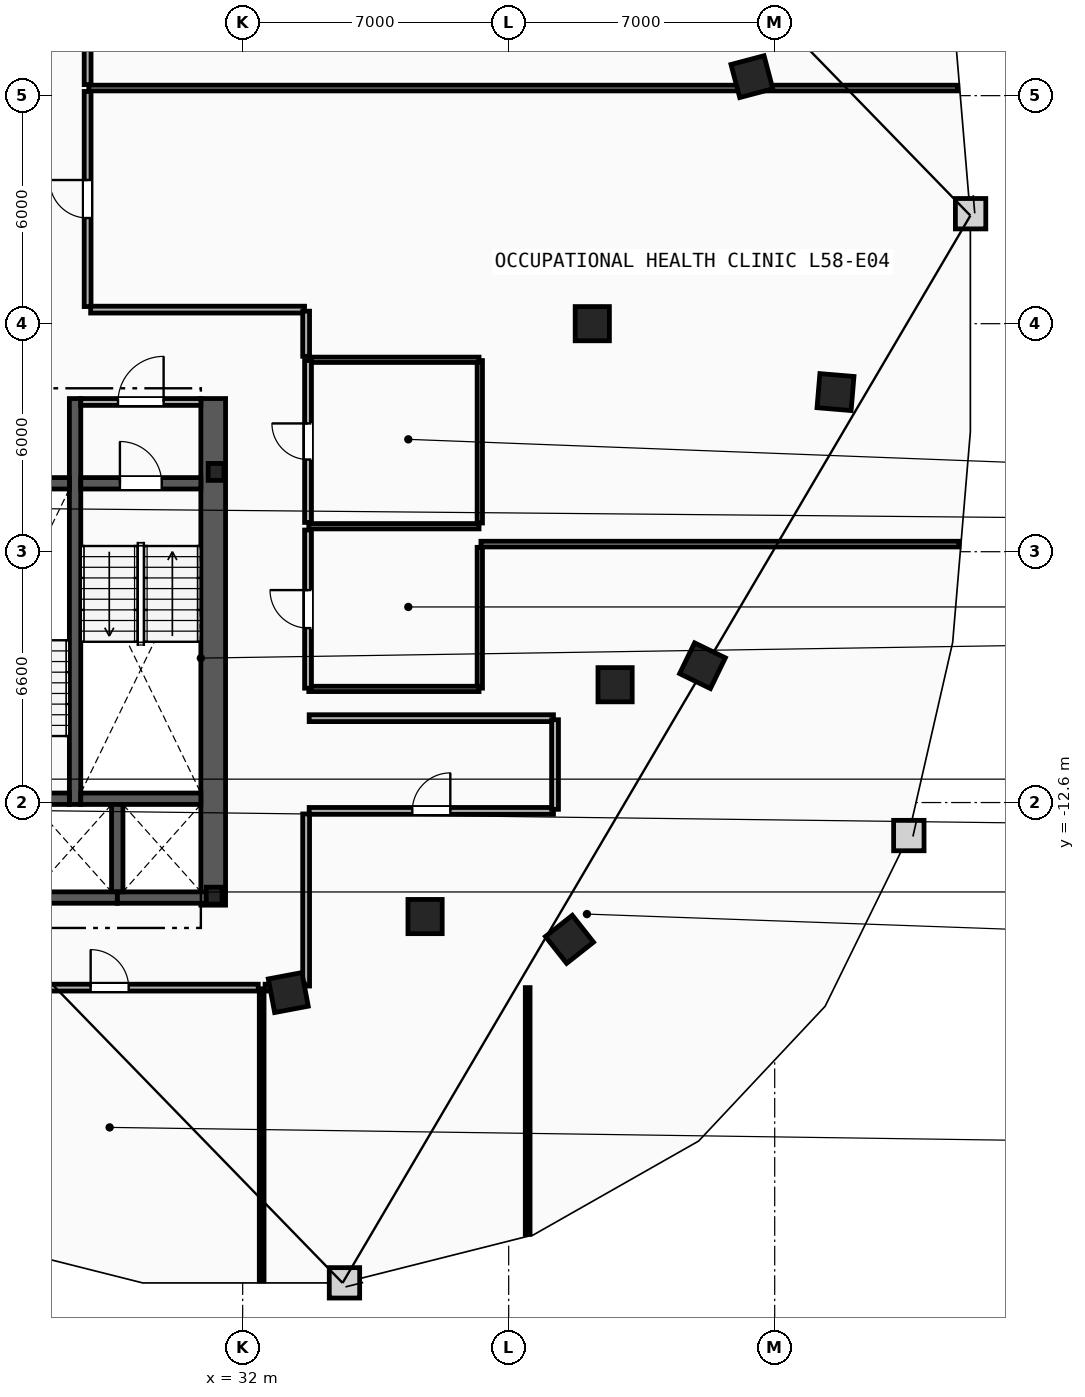
"""IFC4 building model, lengths in metres.
Left out: names, types, materials, properties, quantities, classifications, styles, units other than length and angle.
Written with IfcOpenShell. Run it as: python <this file> out.ifc"""

import sys

from ifc_helpers import new_model, si_unit, direction, frame, frame_2d, origin, origin_2d, place, context, subcontext, project, spatial, rectangle, i_section, extrude, element, fill, save


model = new_model("IFC4")
c1 = context("Model", 3, precision=1e-05, world=origin(), true_north=direction((0.0, 1.0)))
c2 = subcontext(c1, "Body", "Model", "MODEL_VIEW")
j1 = project(units=[si_unit("LENGTHUNIT", "METRE"), si_unit("PLANEANGLEUNIT", "RADIAN")], contexts=[c1])
p1 = place(None, origin())
s1 = spatial("IfcSite", under=j1, at=p1, CompositionType="ELEMENT")
p2 = place(p1, origin())
s2 = spatial("IfcBuilding", under=s1, at=p2, CompositionType="ELEMENT")
p3 = place(p2, frame((0.0, 0.0, 220.6)))
s3 = spatial("IfcBuildingStorey", under=s2, at=p3, CompositionType="ELEMENT", Elevation=220.6)
for number, where, z_axis, x_axis in (
    (1, (31.3, -3.9, 0.0), (0.0, 0.0, 1.0), (1.0, 0.0, 0.0)),
    (2, (31.25, -15.05, 0.0), (0.0, 0.0, 1.0), (1.0, 0.0, 0.0)),
):
    element("IfcColumn", number, at=place(p3, frame(where, z_axis=z_axis, x_axis=x_axis)), inside=s3, PredefinedType="COLUMN", context=c2, shape_type="SweptSolid", body=[
        extrude(i_section(OverallWidth=0.416, OverallDepth=0.446, WebThickness=0.039, FlangeThickness=0.063, FilletRadius=0.018, at=origin_2d()), origin(), (0.0, 0.0, 1.0), 3.6),
    ])
for number, where, z_axis, x_axis in (
    (3, (41.2, 0.0, 0.0), (0.0, 0.0, 1.0), (1.0, 0.0, 0.0)),
    (4, (41.8, -9.5, 0.0), (0.0, 0.0, 1.0), (1.0, 0.0, 0.0)),
    (5, (36.8, -15.6, 0.0), (0.0, 0.0, 1.0), (1.0, 0.0, 0.0)),
    (6, (33.2, -17.6, 0.0), (0.0, 0.0, 1.0), (0.983, 0.186, 0.0)),
    (7, (40.6, -16.2, 0.0), (0.0, 0.0, 1.0), (0.785, 0.619, 0.0)),
    (8, (44.1, -9.0, 0.0), (0.0, 0.0, 1.0), (0.437, 0.899, 0.0)),
    (9, (47.6, -1.8, 0.0), (0.0, 0.0, 1.0), (0.084, 0.997, 0.0)),
    (10, (45.4, 6.5, 0.0), (0.0, 0.0, 1.0), (-0.256, 0.967, 0.0)),
):
    element("IfcColumn", number, at=place(p3, frame(where, z_axis=z_axis, x_axis=x_axis)), inside=s3, PredefinedType="COLUMN", context=c2, shape_type="SweptSolid", body=[
        extrude(rectangle(XDim=0.9, YDim=0.9, at=origin_2d()), origin(), (0.0, 0.0, 1.0), 3.6),
    ])
p4 = place(p3, frame((31.225, -15.3, 0.0), z_axis=(0.0, 0.0, 1.0), x_axis=(0.0, 1.0, 0.0)))
e11 = element("IfcWall", 11, at=p4, inside=s3, PredefinedType="SHEAR", context=c2, shape_type="SweptSolid", body=[
    extrude(rectangle(XDim=13.33, YDim=0.65, at=frame_2d((6.665, 0.0))), origin(), (0.0, 0.0, 1.0), 3.34),
])
p5 = place(p3, frame((27.59, -12.65, 0.0), z_axis=(0.0, 0.0, 1.0), x_axis=(0.0, 1.0, 0.0)))
e12 = element("IfcWall", 12, at=p5, inside=s3, PredefinedType="SHEAR", context=c2, shape_type="SweptSolid", body=[
    extrude(rectangle(XDim=10.68, YDim=0.3, at=frame_2d((5.34, 0.0))), origin(), (0.0, 0.0, 1.0), 3.34),
])
p6 = place(p3, frame((27.74, -4.2, 0.0), z_axis=(0.0, 0.0, 1.0), x_axis=(1.0, 0.0, 0.0)))
e13 = element("IfcWall", 13, at=p6, inside=s3, PredefinedType="SHEAR", context=c2, shape_type="SweptSolid", body=[
    extrude(rectangle(XDim=3.16, YDim=0.3, at=frame_2d((1.58, 0.0))), origin(), (0.0, 0.0, 1.0), 3.34),
])
p7 = place(p6, frame((1.03, 0.0, 0.0)))
e14 = element("IfcOpeningElement", 14, at=p7, cuts=e13, PredefinedType="OPENING", context=c2, shape_type="SweptSolid", body=[
    extrude(rectangle(XDim=1.1, YDim=2.15, at=frame_2d((0.55, 1.075))), frame((0.0, 0.16, 0.0), z_axis=(0.0, -1.0, 0.0), x_axis=(1.0, 0.0, 0.0)), (0.0, 0.0, 1.0), 0.32),
])
p8 = place(p3, frame((27.74, -12.5, 0.0), z_axis=(0.0, 0.0, 1.0), x_axis=(1.0, 0.0, 0.0)))
e15 = element("IfcWall", 15, at=p8, inside=s3, PredefinedType="SHEAR", context=c2, shape_type="SweptSolid", body=[
    extrude(rectangle(XDim=3.16, YDim=0.3, at=frame_2d((1.58, 0.0))), origin(), (0.0, 0.0, 1.0), 3.34),
])
p9 = place(p3, frame((24.28, -12.5, 0.0), z_axis=(0.0, 0.0, 1.0), x_axis=(1.0, 0.0, 0.0)))
e16 = element("IfcWall", 16, at=p9, inside=s3, PredefinedType="SHEAR", context=c2, shape_type="SweptSolid", body=[
    extrude(rectangle(XDim=3.16, YDim=0.3, at=frame_2d((1.58, 0.0))), origin(), (0.0, 0.0, 1.0), 3.34),
])
p10 = place(p9, frame((1.03, 0.0, 0.0)))
e17 = element("IfcOpeningElement", 17, at=p10, cuts=e16, PredefinedType="OPENING", context=c2, shape_type="SweptSolid", body=[
    extrude(rectangle(XDim=1.1, YDim=2.15, at=frame_2d((0.55, 1.075))), frame((0.0, 0.16, 0.0), z_axis=(0.0, -1.0, 0.0), x_axis=(1.0, 0.0, 0.0)), (0.0, 0.0, 1.0), 0.32),
])
p11 = place(p3, frame((24.28, -4.2, 0.0), z_axis=(0.0, 0.0, 1.0), x_axis=(1.0, 0.0, 0.0)))
e18 = element("IfcWall", 18, at=p11, inside=s3, PredefinedType="SHEAR", context=c2, shape_type="SweptSolid", body=[
    extrude(rectangle(XDim=3.16, YDim=0.3, at=frame_2d((1.58, 0.0))), origin(), (0.0, 0.0, 1.0), 3.34),
])
p12 = place(p3, frame((27.74, -2.06, 0.0), z_axis=(0.0, 0.0, 1.0), x_axis=(1.0, 0.0, 0.0)))
e19 = element("IfcWall", 19, at=p12, inside=s3, PredefinedType="PARTITIONING", context=c2, shape_type="SweptSolid", body=[
    extrude(rectangle(XDim=3.16, YDim=0.18, at=frame_2d((1.58, 0.0))), origin(), (0.0, 0.0, 1.0), 3.34),
])
p13 = place(p12, frame((0.98, 0.0, 0.0)))
e20 = element("IfcOpeningElement", 20, at=p13, cuts=e19, PredefinedType="OPENING", context=c2, shape_type="SweptSolid", body=[
    extrude(rectangle(XDim=1.2, YDim=2.15, at=frame_2d((0.6, 1.075))), frame((0.0, 0.1, 0.0), z_axis=(0.0, -1.0, 0.0), x_axis=(1.0, 0.0, 0.0)), (0.0, 0.0, 1.0), 0.2),
])
p14 = place(p3, frame((28.7, -15.1, 0.0), z_axis=(0.0, 0.0, 1.0), x_axis=(1.0, 0.0, 0.0)))
e21 = element("IfcWall", 21, at=p14, inside=s3, PredefinedType="SHEAR", context=c2, shape_type="SweptSolid", body=[
    extrude(rectangle(XDim=2.5, YDim=0.3, at=frame_2d((1.25, 0.0))), origin(), (0.0, 0.0, 1.0), 3.34),
])
p15 = place(p3, frame((28.7, -14.95, 0.0), z_axis=(0.0, 0.0, 1.0), x_axis=(0.0, 1.0, 0.0)))
e22 = element("IfcWall", 22, at=p15, inside=s3, PredefinedType="SHEAR", context=c2, shape_type="SweptSolid", body=[
    extrude(rectangle(XDim=2.3, YDim=0.3, at=frame_2d((1.15, 0.0))), origin(), (0.0, 0.0, 1.0), 3.34),
])
p16 = place(p3, frame((26.2, -15.1, 0.0), z_axis=(0.0, 0.0, 1.0), x_axis=(1.0, 0.0, 0.0)))
e23 = element("IfcWall", 23, at=p16, inside=s3, PredefinedType="SHEAR", context=c2, shape_type="SweptSolid", body=[
    extrude(rectangle(XDim=2.5, YDim=0.3, at=frame_2d((1.25, 0.0))), origin(), (0.0, 0.0, 1.0), 3.34),
])
p17 = place(p3, frame((38.24, -9.59, 0.0), z_axis=(0.0, 0.0, 1.0), x_axis=(0.0, 1.0, 0.0)))
e24 = element("IfcWall", 24, at=p17, inside=s3, PredefinedType="PARTITIONING", context=c2, shape_type="SweptSolid", body=[
    extrude(rectangle(XDim=3.705, YDim=0.14, at=frame_2d((1.853, 0.0))), origin(), (0.0, 0.0, 1.0), 3.34),
])
p18 = place(p3, frame((38.24, -5.245, 0.0), z_axis=(0.0, 0.0, 1.0), x_axis=(0.0, 1.0, 0.0)))
e25 = element("IfcWall", 25, at=p18, inside=s3, PredefinedType="PARTITIONING", context=c2, shape_type="SweptSolid", body=[
    extrude(rectangle(XDim=4.275, YDim=0.14, at=frame_2d((2.138, 0.0))), origin(), (0.0, 0.0, 1.0), 3.34),
])
for number, where, z_axis, x_axis in (
    (26, (33.74, -0.95, 0.0), (0.0, 0.0, 1.0), (1.0, 0.0, 0.0)),
    (27, (33.74, -5.33, 0.0), (0.0, 0.0, 1.0), (1.0, 0.0, 0.0)),
    (28, (33.74, -9.61, 0.0), (0.0, 0.0, 1.0), (1.0, 0.0, 0.0)),
):
    element("IfcWall", number, at=place(p3, frame(where, z_axis=z_axis, x_axis=x_axis)), inside=s3, PredefinedType="PARTITIONING", context=c2, shape_type="SweptSolid", body=[
        extrude(rectangle(XDim=4.48, YDim=0.14, at=frame_2d((2.24, 0.0))), origin(), (0.0, 0.0, 1.0), 3.34),
    ])
p19 = place(p3, frame((33.72, -5.23, 0.0), z_axis=(0.0, 0.0, 1.0), x_axis=(0.0, 1.0, 0.0)))
e29 = element("IfcWall", 29, at=p19, inside=s3, PredefinedType="PARTITIONING", context=c2, shape_type="SweptSolid", body=[
    extrude(rectangle(XDim=4.26, YDim=0.18, at=frame_2d((2.13, 0.0))), origin(), (0.0, 0.0, 1.0), 3.34),
])
p20 = place(p19, frame((1.655, 0.0, 0.0)))
e30 = element("IfcOpeningElement", 30, at=p20, cuts=e29, PredefinedType="OPENING", context=c2, shape_type="SweptSolid", body=[
    extrude(rectangle(XDim=0.95, YDim=2.1, at=frame_2d((0.475, 1.05))), frame((0.0, 0.1, 0.0), z_axis=(0.0, -1.0, 0.0), x_axis=(1.0, 0.0, 0.0)), (0.0, 0.0, 1.0), 0.2),
])
p21 = place(p3, frame((33.72, -9.59, 0.0), z_axis=(0.0, 0.0, 1.0), x_axis=(0.0, 1.0, 0.0)))
e31 = element("IfcWall", 31, at=p21, inside=s3, PredefinedType="PARTITIONING", context=c2, shape_type="SweptSolid", body=[
    extrude(rectangle(XDim=4.16, YDim=0.18, at=frame_2d((2.08, 0.0))), origin(), (0.0, 0.0, 1.0), 3.34),
])
p22 = place(p21, frame((1.58, 0.0, 0.0)))
e32 = element("IfcOpeningElement", 32, at=p22, cuts=e31, PredefinedType="OPENING", context=c2, shape_type="SweptSolid", body=[
    extrude(rectangle(XDim=1.0, YDim=2.15, at=frame_2d((0.5, 1.075))), frame((0.0, 0.1, 0.0), z_axis=(0.0, -1.0, 0.0), x_axis=(1.0, 0.0, 0.0)), (0.0, 0.0, 1.0), 0.2),
])
p23 = place(p3, frame((27.95, 6.2, 0.0), z_axis=(0.0, 0.0, 1.0), x_axis=(1.0, 0.0, 0.0)))
e33 = element("IfcWall", 33, at=p23, inside=s3, PredefinedType="PARTITIONING", context=c2, shape_type="SweptSolid", body=[
    extrude(rectangle(XDim=22.867, YDim=0.15, at=frame_2d((11.434, 0.0))), origin(), (0.0, 0.0, 1.0), 3.34),
])
p24 = place(p3, frame((38.27, -5.8, 0.0), z_axis=(0.0, 0.0, 1.0), x_axis=(1.0, 0.0, 0.0)))
e34 = element("IfcWall", 34, at=p24, inside=s3, PredefinedType="PARTITIONING", context=c2, shape_type="SweptSolid", body=[
    extrude(rectangle(XDim=12.581, YDim=0.15, at=frame_2d((6.29, 0.0))), origin(), (0.0, 0.0, 1.0), 3.34),
])
p25 = place(p3, frame((32.5, -25.19, 0.0), z_axis=(0.0, 0.0, 1.0), x_axis=(0.0, 1.0, 0.0)))
e35 = element("IfcWall", 35, at=p25, inside=s3, PredefinedType="PARTITIONING", context=c2, shape_type="SweptSolid", body=[
    extrude(rectangle(XDim=7.69, YDim=0.125, at=frame_2d((3.845, 0.0))), origin(), (0.0, 0.0, 1.0), 3.34),
])
p26 = place(p3, frame((39.5, -23.963, 0.0), z_axis=(0.0, 0.0, 1.0), x_axis=(0.0, 1.0, 0.0)))
e36 = element("IfcWall", 36, at=p26, inside=s3, PredefinedType="PARTITIONING", context=c2, shape_type="SweptSolid", body=[
    extrude(rectangle(XDim=6.493, YDim=0.125, at=frame_2d((3.246, 0.0))), origin(), (0.0, 0.0, 1.0), 3.34),
])
p27 = place(p3, frame((24.59, -17.47, 0.0), z_axis=(0.0, 0.0, 1.0), x_axis=(1.0, 0.0, 0.0)))
e37 = element("IfcWall", 37, at=p27, inside=s3, PredefinedType="PARTITIONING", context=c2, shape_type="SweptSolid", body=[
    extrude(rectangle(XDim=7.82, YDim=0.18, at=frame_2d((3.91, 0.0))), origin(), (0.0, 0.0, 1.0), 3.34),
])
p28 = place(p27, frame((3.41, 0.0, 0.0)))
e38 = element("IfcOpeningElement", 38, at=p28, cuts=e37, PredefinedType="OPENING", context=c2, shape_type="SweptSolid", body=[
    extrude(rectangle(XDim=1.0, YDim=2.15, at=frame_2d((0.5, 1.075))), frame((0.0, 0.1, 0.0), z_axis=(0.0, -1.0, 0.0), x_axis=(1.0, 0.0, 0.0)), (0.0, 0.0, 1.0), 0.2),
])
p29 = place(p3, frame((33.75, -12.82, 0.0), z_axis=(0.0, 0.0, 1.0), x_axis=(1.0, 0.0, 0.0)))
e39 = element("IfcWall", 39, at=p29, inside=s3, PredefinedType="PARTITIONING", context=c2, shape_type="SweptSolid", body=[
    extrude(rectangle(XDim=6.428, YDim=0.18, at=frame_2d((3.214, 0.0))), origin(), (0.0, 0.0, 1.0), 3.34),
])
p30 = place(p29, frame((2.714, 0.0, 0.0)))
e40 = element("IfcOpeningElement", 40, at=p30, cuts=e39, PredefinedType="OPENING", context=c2, shape_type="SweptSolid", body=[
    extrude(rectangle(XDim=1.0, YDim=2.15, at=frame_2d((0.5, 1.075))), frame((0.0, 0.1, 0.0), z_axis=(0.0, -1.0, 0.0), x_axis=(1.0, 0.0, 0.0)), (0.0, 0.0, 1.0), 0.2),
])
p31 = place(p3, frame((40.178, -10.38, 0.0), z_axis=(0.0, 0.0, 1.0), x_axis=(-1.0, 0.0, 0.0)))
e41 = element("IfcWall", 41, at=p31, inside=s3, PredefinedType="PARTITIONING", context=c2, shape_type="SweptSolid", body=[
    extrude(rectangle(XDim=6.428, YDim=0.18, at=frame_2d((3.214, 0.0))), origin(), (0.0, 0.0, 1.0), 3.34),
])
p32 = place(p3, frame((33.67, -17.428, 0.0), z_axis=(0.0, 0.0, 1.0), x_axis=(0.0, 1.0, 0.0)))
e42 = element("IfcWall", 42, at=p32, inside=s3, PredefinedType="PARTITIONING", context=c2, shape_type="SweptSolid", body=[
    extrude(rectangle(XDim=4.529, YDim=0.18, at=frame_2d((2.264, 0.0))), origin(), (0.0, 0.0, 1.0), 3.34),
])
p33 = place(p3, frame((40.22, -12.779, 0.0), z_axis=(0.0, 0.0, 1.0), x_axis=(0.0, 1.0, 0.0)))
e43 = element("IfcWall", 43, at=p33, inside=s3, PredefinedType="PARTITIONING", context=c2, shape_type="SweptSolid", body=[
    extrude(rectangle(XDim=2.357, YDim=0.18, at=frame_2d((1.179, 0.0))), origin(), (0.0, 0.0, 1.0), 3.34),
])
p34 = place(p3, frame((32.59, -17.47, 0.0), z_axis=(0.0, 0.0, 1.0), x_axis=(1.0, 0.0, 0.0)))
e44 = element("IfcWall", 44, at=p34, inside=s3, PredefinedType="PARTITIONING", context=c2, shape_type="SweptSolid", body=[
    extrude(rectangle(XDim=1.038, YDim=0.18, at=frame_2d((0.519, 0.0))), origin(), (0.0, 0.0, 1.0), 3.34),
])
p35 = place(p3, frame((27.92, 0.45, 0.0), z_axis=(0.0, 0.0, 1.0), x_axis=(0.0, 1.0, 0.0)))
e45 = element("IfcWall", 45, at=p35, inside=s3, PredefinedType="PARTITIONING", context=c2, shape_type="SweptSolid", body=[
    extrude(rectangle(XDim=5.66, YDim=0.18, at=frame_2d((2.83, 0.0))), origin(), (0.0, 0.0, 1.0), 3.34),
])
p36 = place(p35, frame((2.33, 0.0, 0.0)))
e46 = element("IfcOpeningElement", 46, at=p36, cuts=e45, PredefinedType="OPENING", context=c2, shape_type="SweptSolid", body=[
    extrude(rectangle(XDim=1.0, YDim=2.15, at=frame_2d((0.5, 1.075))), frame((0.0, 0.1, 0.0), z_axis=(0.0, -1.0, 0.0), x_axis=(1.0, 0.0, 0.0)), (0.0, 0.0, 1.0), 0.2),
])
p37 = place(p3, frame((33.628, 0.37, 0.0), z_axis=(0.0, 0.0, 1.0), x_axis=(-1.0, 0.0, 0.0)))
e47 = element("IfcWall", 47, at=p37, inside=s3, PredefinedType="PARTITIONING", context=c2, shape_type="SweptSolid", body=[
    extrude(rectangle(XDim=5.628, YDim=0.18, at=frame_2d((2.814, 0.0))), origin(), (0.0, 0.0, 1.0), 3.34),
])
p38 = place(p3, frame((33.67, -0.859, 0.0), z_axis=(0.0, 0.0, 1.0), x_axis=(0.0, 1.0, 0.0)))
e48 = element("IfcWall", 48, at=p38, inside=s3, PredefinedType="PARTITIONING", context=c2, shape_type="SweptSolid", body=[
    extrude(rectangle(XDim=1.187, YDim=0.18, at=frame_2d((0.594, 0.0))), origin(), (0.0, 0.0, 1.0), 3.34),
])
p39 = place(p3, frame((27.92, 6.29, 0.0), z_axis=(0.0, 0.0, 1.0), x_axis=(0.0, 1.0, 0.0)))
e49 = element("IfcWall", 49, at=p39, inside=s3, PredefinedType="PARTITIONING", context=c2, shape_type="SweptSolid", body=[
    extrude(rectangle(XDim=4.888, YDim=0.18, at=frame_2d((2.444, 0.0))), origin(), (0.0, 0.0, 1.0), 3.34),
])
p40 = place(p39, frame((1.944, 0.0, 0.0)))
e50 = element("IfcOpeningElement", 50, at=p40, cuts=e49, PredefinedType="OPENING", context=c2, shape_type="SweptSolid", body=[
    extrude(rectangle(XDim=1.0, YDim=2.15, at=frame_2d((0.5, 1.075))), frame((0.0, 0.1, 0.0), z_axis=(0.0, -1.0, 0.0), x_axis=(1.0, 0.0, 0.0)), (0.0, 0.0, 1.0), 0.2),
])
p41 = place(p7, origin())
e51 = element("IfcDoor", 51, at=p41, inside=s3, OperationType="SINGLE_SWING_LEFT", PredefinedType="DOOR", context=c2, shape_type="SweptSolid", body=[
    extrude(rectangle(XDim=1.1, YDim=2.15, at=frame_2d((0.55, 1.075))), frame((0.0, 0.025, 0.0), z_axis=(0.0, -1.0, 0.0), x_axis=(1.0, 0.0, 0.0)), (0.0, 0.0, 1.0), 0.05),
])
fill(e14, e51)
p42 = place(p13, origin())
e52 = element("IfcDoor", 52, at=p42, inside=s3, OperationType="SINGLE_SWING_RIGHT", PredefinedType="DOOR", context=c2, shape_type="SweptSolid", body=[
    extrude(rectangle(XDim=1.2, YDim=2.15, at=frame_2d((0.6, 1.075))), frame((0.0, 0.025, 0.0), z_axis=(0.0, -1.0, 0.0), x_axis=(1.0, 0.0, 0.0)), (0.0, 0.0, 1.0), 0.05),
])
fill(e20, e52)
p43 = place(p28, origin())
e53 = element("IfcDoor", 53, at=p43, inside=s3, OperationType="SINGLE_SWING_LEFT", PredefinedType="DOOR", context=c2, shape_type="SweptSolid", body=[
    extrude(rectangle(XDim=1.0, YDim=2.15, at=frame_2d((0.5, 1.075))), frame((0.0, 0.025, 0.0), z_axis=(0.0, -1.0, 0.0), x_axis=(1.0, 0.0, 0.0)), (0.0, 0.0, 1.0), 0.05),
])
fill(e38, e53)
p44 = place(p30, origin())
e54 = element("IfcDoor", 54, at=p44, inside=s3, OperationType="SINGLE_SWING_RIGHT", PredefinedType="DOOR", context=c2, shape_type="SweptSolid", body=[
    extrude(rectangle(XDim=1.0, YDim=2.15, at=frame_2d((0.5, 1.075))), frame((0.0, 0.025, 0.0), z_axis=(0.0, -1.0, 0.0), x_axis=(1.0, 0.0, 0.0)), (0.0, 0.0, 1.0), 0.05),
])
fill(e40, e54)
p45 = place(p36, origin())
e55 = element("IfcDoor", 55, at=p45, inside=s3, OperationType="SINGLE_SWING_RIGHT", PredefinedType="DOOR", context=c2, shape_type="SweptSolid", body=[
    extrude(rectangle(XDim=1.0, YDim=2.15, at=frame_2d((0.5, 1.075))), frame((0.0, 0.025, 0.0), z_axis=(0.0, -1.0, 0.0), x_axis=(1.0, 0.0, 0.0)), (0.0, 0.0, 1.0), 0.05),
])
fill(e46, e55)
p46 = place(p20, origin())
e56 = element("IfcDoor", 56, at=p46, inside=s3, OperationType="SINGLE_SWING_RIGHT", PredefinedType="DOOR", context=c2, shape_type="SweptSolid", body=[
    extrude(rectangle(XDim=0.95, YDim=2.1, at=frame_2d((0.475, 1.05))), frame((0.0, 0.025, 0.0), z_axis=(0.0, -1.0, 0.0), x_axis=(1.0, 0.0, 0.0)), (0.0, 0.0, 1.0), 0.05),
])
fill(e30, e56)
p47 = place(p22, origin())
e57 = element("IfcDoor", 57, at=p47, inside=s3, OperationType="SINGLE_SWING_RIGHT", PredefinedType="DOOR", context=c2, shape_type="SweptSolid", body=[
    extrude(rectangle(XDim=1.0, YDim=2.15, at=frame_2d((0.5, 1.075))), frame((0.0, 0.025, 0.0), z_axis=(0.0, -1.0, 0.0), x_axis=(1.0, 0.0, 0.0)), (0.0, 0.0, 1.0), 0.05),
])
fill(e32, e57)
save(model, sys.argv[1])
